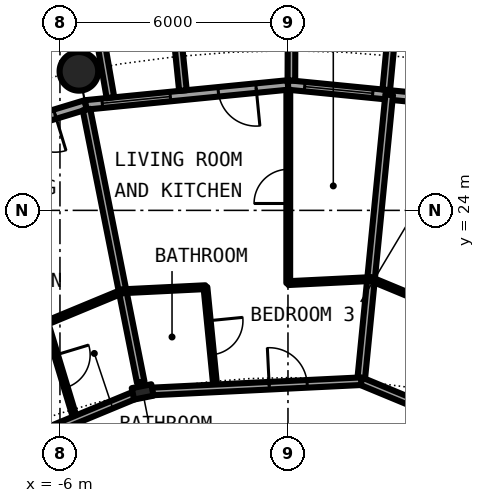
"""IFC4 building model, lengths in metres.
Left out: names, types, materials, properties, quantities, classifications, styles, units other than length and angle.
Written with IfcOpenShell. Run it as: python <this file> out.ifc"""

import sys

from ifc_helpers import new_model, si_unit, direction, frame, frame_2d, origin, origin_2d, place, context, subcontext, project, spatial, rectangle, hollow_circle, i_section, extrude, element, fill, save


model = new_model("IFC4")
c1 = context("Model", 3, precision=1e-05, world=origin(), true_north=direction((0.0, 1.0)))
c2 = subcontext(c1, "Body", "Model", "MODEL_VIEW")
j1 = project(units=[si_unit("LENGTHUNIT", "METRE"), si_unit("PLANEANGLEUNIT", "RADIAN")], contexts=[c1])
p1 = place(None, origin())
s1 = spatial("IfcSite", under=j1, at=p1, CompositionType="ELEMENT")
p2 = place(p1, origin())
s2 = spatial("IfcBuilding", under=s1, at=p2, CompositionType="ELEMENT")
p3 = place(p2, frame((0.0, 0.0, 69.7)))
s3 = spatial("IfcBuildingStorey", under=s2, at=p3, CompositionType="ELEMENT", Elevation=69.7)
p4 = place(p3, frame((-5.501, 27.658, 0.0), z_axis=(0.0, 0.0, 1.0), x_axis=(1.0, 0.0, 0.0)))
e1 = element("IfcColumn", 1, at=p4, inside=s3, PredefinedType="COLUMN", context=c2, shape_type="SweptSolid", body=[
    extrude(hollow_circle(Radius=0.508, WallThickness=0.04, at=origin_2d()), origin(), (0.0, 0.0, 1.0), 3.05),
])
p5 = place(p3, frame((-3.824, 19.223, 0.0), z_axis=(0.0, 0.0, 1.0), x_axis=(-0.195090322016, 0.980785280403, 0.0)))
e2 = element("IfcColumn", 2, at=p5, inside=s3, PredefinedType="COLUMN", context=c2, shape_type="SweptSolid", body=[
    extrude(i_section(OverallWidth=0.306, OverallDepth=0.524, WebThickness=0.021, FlangeThickness=0.04, FilletRadius=0.027, at=origin_2d()), origin(), (0.0, 0.0, 1.0), 3.05),
])
p6 = place(p3, frame((5.326, 26.775, 0.0), z_axis=(0.0, 0.0, 1.0), x_axis=(-0.995173996315, 0.098126026407, 0.0)))
e3 = element("IfcWall", 3, at=p6, inside=s3, PredefinedType="SOLIDWALL", context=c2, shape_type="SweptSolid", body=[
    extrude(rectangle(XDim=5.352, YDim=0.25, at=frame_2d((2.676, 0.0))), origin(), (0.0, 0.0, 1.0), 2.7),
])
p7 = place(p6, frame((0.841, 0.0, 0.0)))
e4 = element("IfcOpeningElement", 4, at=p7, cuts=e3, PredefinedType="OPENING", context=c2, shape_type="SweptSolid", body=[
    extrude(rectangle(XDim=1.0, YDim=2.2, at=frame_2d((0.5, 1.1))), frame((0.0, 0.135, 0.0), z_axis=(0.0, -1.0, 0.0), x_axis=(1.0, 0.0, 0.0)), (0.0, 0.0, 1.0), 0.27),
])
p8 = place(p6, frame((3.111, 0.0, 0.3)))
e5 = element("IfcOpeningElement", 5, at=p8, cuts=e3, PredefinedType="OPENING", context=c2, shape_type="SweptSolid", body=[
    extrude(rectangle(XDim=1.8, YDim=2.1, at=frame_2d((0.9, 1.05))), frame((0.0, 0.135, 0.0), z_axis=(0.0, -1.0, 0.0), x_axis=(1.0, 0.0, 0.0)), (0.0, 0.0, 1.0), 0.27),
])
p9 = place(p3, frame((2.586, 27.171, -0.03), z_axis=(0.0, 0.0, 1.0), x_axis=(0.094548432284, 0.995520262954, 0.0)))
e6 = element("IfcWall", 6, at=p9, inside=s3, PredefinedType="SOLIDWALL", context=c2, shape_type="SweptSolid", body=[
    extrude(rectangle(XDim=3.006, YDim=0.2, at=frame_2d((1.503, 0.0))), origin(), (0.0, 0.0, 1.0), 2.73),
])
p10 = place(p3, frame((0.09, 27.417, -0.03), z_axis=(0.0, 0.0, 1.0), x_axis=(0.00347308367, 0.999993968827, 0.0)))
e7 = element("IfcWall", 7, at=p10, inside=s3, PredefinedType="SOLIDWALL", context=c2, shape_type="SweptSolid", body=[
    extrude(rectangle(XDim=2.882, YDim=0.2, at=frame_2d((1.441, 0.0))), origin(), (0.0, 0.0, 1.0), 2.73),
])
p11 = place(p3, frame((0.0, 27.3, 0.0), z_axis=(0.0, 0.0, 1.0), x_axis=(-0.995173996315, -0.098126026407, 0.0)))
e8 = element("IfcWall", 8, at=p11, inside=s3, PredefinedType="SOLIDWALL", context=c2, shape_type="SweptSolid", body=[
    extrude(rectangle(XDim=5.352, YDim=0.25, at=frame_2d((2.676, 0.0))), origin(), (0.0, 0.0, 1.0), 2.7),
])
p12 = place(p11, frame((0.841, 0.0, 0.0)))
e9 = element("IfcOpeningElement", 9, at=p12, cuts=e8, PredefinedType="OPENING", context=c2, shape_type="SweptSolid", body=[
    extrude(rectangle(XDim=1.0, YDim=2.2, at=frame_2d((0.5, 1.1))), frame((0.0, 0.135, 0.0), z_axis=(0.0, -1.0, 0.0), x_axis=(1.0, 0.0, 0.0)), (0.0, 0.0, 1.0), 0.27),
])
p13 = place(p11, frame((3.111, 0.0, 0.3)))
e10 = element("IfcOpeningElement", 10, at=p13, cuts=e8, PredefinedType="OPENING", context=c2, shape_type="SweptSolid", body=[
    extrude(rectangle(XDim=1.8, YDim=2.1, at=frame_2d((0.9, 1.05))), frame((0.0, 0.135, 0.0), z_axis=(0.0, -1.0, 0.0), x_axis=(1.0, 0.0, 0.0)), (0.0, 0.0, 1.0), 0.27),
])
p14 = place(p3, frame((-2.764, 27.153, -0.03), z_axis=(0.0, 0.0, 1.0), x_axis=(-0.101505487237, 0.994834979311, 0.0)))
e11 = element("IfcWall", 11, at=p14, inside=s3, PredefinedType="SOLIDWALL", context=c2, shape_type="SweptSolid", body=[
    extrude(rectangle(XDim=3.007, YDim=0.2, at=frame_2d((1.503, 0.0))), origin(), (0.0, 0.0, 1.0), 2.73),
])
p15 = place(p3, frame((-4.671, 26.966, -0.03), z_axis=(0.0, 0.0, 1.0), x_axis=(-0.170539878907, 0.985350774954, 0.0)))
e12 = element("IfcWall", 12, at=p15, inside=s3, PredefinedType="SOLIDWALL", context=c2, shape_type="SweptSolid", body=[
    extrude(rectangle(XDim=2.932, YDim=0.2, at=frame_2d((1.466, 0.0))), origin(), (0.0, 0.0, 1.0), 2.73),
])
p16 = place(p3, frame((-5.326, 26.775, 0.0), z_axis=(0.0, 0.0, 1.0), x_axis=(-0.956965678721, -0.290201119486, 0.0)))
e13 = element("IfcWall", 13, at=p16, inside=s3, PredefinedType="SOLIDWALL", context=c2, shape_type="SweptSolid", body=[
    extrude(rectangle(XDim=5.351, YDim=0.25, at=frame_2d((2.676, 0.0))), origin(), (0.0, 0.0, 1.0), 2.7),
])
p17 = place(p16, frame((0.841, 0.0, 0.0)))
e14 = element("IfcOpeningElement", 14, at=p17, cuts=e13, PredefinedType="OPENING", context=c2, shape_type="SweptSolid", body=[
    extrude(rectangle(XDim=1.0, YDim=2.2, at=frame_2d((0.5, 1.1))), frame((0.0, 0.135, 0.0), z_axis=(0.0, -1.0, 0.0), x_axis=(1.0, 0.0, 0.0)), (0.0, 0.0, 1.0), 0.27),
])
p18 = place(p16, frame((3.111, 0.0, 0.3)))
e15 = element("IfcOpeningElement", 15, at=p18, cuts=e13, PredefinedType="OPENING", context=c2, shape_type="SweptSolid", body=[
    extrude(rectangle(XDim=1.8, YDim=2.1, at=frame_2d((0.9, 1.05))), frame((0.0, 0.135, 0.0), z_axis=(0.0, -1.0, 0.0), x_axis=(1.0, 0.0, 0.0)), (0.0, 0.0, 1.0), 0.27),
])
p19 = place(p3, frame((-6.36, 21.039, 0.0), z_axis=(0.0, 0.0, 1.0), x_axis=(0.289375816213, -0.957215564537, 0.0)))
e16 = element("IfcWall", 16, at=p19, inside=s3, PredefinedType="PARTITIONING", context=c2, shape_type="SweptSolid", body=[
    extrude(rectangle(XDim=2.661, YDim=0.1, at=frame_2d((1.331, 0.0))), origin(), (0.0, 0.0, 1.0), 2.7),
])
p20 = place(p19, frame((0.88, 0.0, 0.0)))
e17 = element("IfcOpeningElement", 17, at=p20, cuts=e16, PredefinedType="OPENING", context=c2, shape_type="SweptSolid", body=[
    extrude(rectangle(XDim=0.9, YDim=2.3, at=frame_2d((0.45, 1.15))), frame((0.0, 0.06, 0.0), z_axis=(0.0, -1.0, 0.0), x_axis=(1.0, 0.0, 0.0)), (0.0, 0.0, 1.0), 0.12),
])
p21 = place(p3, frame((-5.302, 26.653, 0.0), z_axis=(0.0, 0.0, 1.0), x_axis=(0.195114589291, -0.98078045303, 0.0)))
e18 = element("IfcWall", 18, at=p21, inside=s3, PredefinedType="PARTITIONING", context=c2, shape_type="SweptSolid", body=[
    extrude(rectangle(XDim=7.314, YDim=0.2, at=frame_2d((3.657, 0.0))), origin(), (0.0, 0.0, 1.0), 2.7),
])
p22 = place(p3, frame((-2.172, 21.979, 0.0), z_axis=(0.0, 0.0, 1.0), x_axis=(0.098383180323, -0.995148606907, 0.0)))
e19 = element("IfcWall", 19, at=p22, inside=s3, PredefinedType="PARTITIONING", context=c2, shape_type="SweptSolid", body=[
    extrude(rectangle(XDim=2.675, YDim=0.1, at=frame_2d((1.337, 0.0))), origin(), (0.0, 0.0, 1.0), 2.7),
])
p23 = place(p22, frame((0.887, 0.0, 0.0)))
e20 = element("IfcOpeningElement", 20, at=p23, cuts=e19, PredefinedType="OPENING", context=c2, shape_type="SweptSolid", body=[
    extrude(rectangle(XDim=0.9, YDim=2.3, at=frame_2d((0.45, 1.15))), frame((0.0, 0.06, 0.0), z_axis=(0.0, -1.0, 0.0), x_axis=(1.0, 0.0, 0.0)), (0.0, 0.0, 1.0), 0.12),
])
p24 = place(p3, frame((0.007, 22.086, 0.0), z_axis=(0.0, 0.0, 1.0), x_axis=(0.000383785052, 0.999999926355, 0.0)))
e21 = element("IfcWall", 21, at=p24, inside=s3, PredefinedType="PARTITIONING", context=c2, shape_type="SweptSolid", body=[
    extrude(rectangle(XDim=5.089, YDim=0.1, at=frame_2d((2.544, 0.0))), origin(), (0.0, 0.0, 1.0), 2.7),
])
p25 = place(p24, frame((2.095, 0.0, 0.0)))
e22 = element("IfcOpeningElement", 22, at=p25, cuts=e21, PredefinedType="OPENING", context=c2, shape_type="SweptSolid", body=[
    extrude(rectangle(XDim=0.9, YDim=2.3, at=frame_2d((0.45, 1.15))), frame((0.0, 0.06, 0.0), z_axis=(0.0, -1.0, 0.0), x_axis=(1.0, 0.0, 0.0)), (0.0, 0.0, 1.0), 0.12),
])
p26 = place(p3, frame((1.921, 19.506, 0.0), z_axis=(0.0, 0.0, 1.0), x_axis=(0.098115395479, 0.995175044487, 0.0)))
e23 = element("IfcWall", 23, at=p26, inside=s3, PredefinedType="PARTITIONING", context=c2, shape_type="SweptSolid", body=[
    extrude(rectangle(XDim=7.574, YDim=0.2, at=frame_2d((3.787, 0.0))), origin(), (0.0, 0.0, 1.0), 2.7),
])
p27 = place(p3, frame((1.921, 19.506, 0.0), z_axis=(0.0, 0.0, 1.0), x_axis=(0.923845560554, -0.38276543763, 0.0)))
e24 = element("IfcWall", 24, at=p27, inside=s3, PredefinedType="PARTITIONING", context=c2, shape_type="SweptSolid", body=[
    extrude(rectangle(XDim=11.381, YDim=0.2, at=frame_2d((5.69, 0.0))), origin(), (0.0, 0.0, 1.0), 2.7),
])
p28 = place(p27, frame((7.087, 0.0, 0.0)))
e25 = element("IfcOpeningElement", 25, at=p28, cuts=e24, PredefinedType="OPENING", context=c2, shape_type="SweptSolid", body=[
    extrude(rectangle(XDim=1.0, YDim=2.3, at=frame_2d((0.5, 1.15))), frame((0.0, 0.11, 0.0), z_axis=(0.0, -1.0, 0.0), x_axis=(1.0, 0.0, 0.0)), (0.0, 0.0, 1.0), 0.22),
])
p29 = place(p3, frame((-10.745, 16.357, 0.0), z_axis=(0.0, 0.0, 1.0), x_axis=(0.923928411035, 0.382565407848, 0.0)))
e26 = element("IfcWall", 26, at=p29, inside=s3, PredefinedType="PARTITIONING", context=c2, shape_type="SweptSolid", body=[
    extrude(rectangle(XDim=7.335, YDim=0.2, at=frame_2d((3.667, 0.0))), origin(), (0.0, 0.0, 1.0), 2.38),
])
p30 = place(p29, frame((2.212, 0.0, 0.0)))
e27 = element("IfcOpeningElement", 27, at=p30, cuts=e26, PredefinedType="OPENING", context=c2, shape_type="SweptSolid", body=[
    extrude(rectangle(XDim=1.0, YDim=2.3, at=frame_2d((0.5, 1.15))), frame((0.0, 0.11, 0.0), z_axis=(0.0, -1.0, 0.0), x_axis=(1.0, 0.0, 0.0)), (0.0, 0.0, 1.0), 0.22),
])
p31 = place(p3, frame((-3.669, 19.231, 0.0), z_axis=(0.0, 0.0, 1.0), x_axis=(0.998803644396, 0.048900715146, 0.0)))
e28 = element("IfcWall", 28, at=p31, inside=s3, PredefinedType="PARTITIONING", context=c2, shape_type="SweptSolid", body=[
    extrude(rectangle(XDim=5.602, YDim=0.2, at=frame_2d((2.801, 0.0))), origin(), (0.0, 0.0, 1.0), 2.38),
])
p32 = place(p31, frame((3.179, 0.0, 0.0)))
e29 = element("IfcOpeningElement", 29, at=p32, cuts=e28, PredefinedType="OPENING", context=c2, shape_type="SweptSolid", body=[
    extrude(rectangle(XDim=1.0, YDim=2.3, at=frame_2d((0.5, 1.15))), frame((0.0, 0.11, 0.0), z_axis=(0.0, -1.0, 0.0), x_axis=(1.0, 0.0, 0.0)), (0.0, 0.0, 1.0), 0.22),
])
p33 = place(p3, frame((2.185, 22.193, 0.0), z_axis=(0.0, 0.0, 1.0), x_axis=(0.923844914631, -0.382766996632, 0.0)))
e30 = element("IfcWall", 30, at=p33, inside=s3, PredefinedType="PARTITIONING", context=c2, shape_type="SweptSolid", body=[
    extrude(rectangle(XDim=6.474, YDim=0.1, at=frame_2d((3.237, 0.0))), origin(), (0.0, 0.0, 1.0), 2.7),
])
p34 = place(p3, frame((-6.36, 21.039, 0.0), z_axis=(0.0, 0.0, 1.0), x_axis=(0.923743082263, 0.383012686436, 0.0)))
e31 = element("IfcWall", 31, at=p34, inside=s3, PredefinedType="PARTITIONING", context=c2, shape_type="SweptSolid", body=[
    extrude(rectangle(XDim=2.175, YDim=0.1, at=frame_2d((1.087, 0.0))), origin(), (0.0, 0.0, 1.0), 2.7),
])
for number, where, z_axis, x_axis in (
    (32, (-4.351, 21.872, 0.0), (0.0, 0.0, 1.0), (0.999, 0.049, 0.0)),
    (33, (0.007, 22.086, 0.0), (0.0, 0.0, 1.0), (0.999, 0.049, 0.0)),
):
    element("IfcWall", number, at=place(p3, frame(where, z_axis=z_axis, x_axis=x_axis)), inside=s3, PredefinedType="PARTITIONING", context=c2, shape_type="SweptSolid", body=[
        extrude(rectangle(XDim=2.182, YDim=0.1, at=frame_2d((1.091, 0.0))), origin(), (0.0, 0.0, 1.0), 2.7),
    ])
p35 = place(p8, origin())
e34 = element("IfcWindow", 34, at=p35, inside=s3, PartitioningType="SINGLE_PANEL", PredefinedType="WINDOW", context=c2, shape_type="SweptSolid", body=[
    extrude(rectangle(XDim=1.8, YDim=2.1, at=frame_2d((0.9, 1.05))), frame((0.0, 0.03, 0.0), z_axis=(0.0, -1.0, 0.0), x_axis=(1.0, 0.0, 0.0)), (0.0, 0.0, 1.0), 0.06),
])
fill(e5, e34)
p36 = place(p12, origin())
e35 = element("IfcDoor", 35, at=p36, inside=s3, OperationType="SINGLE_SWING_LEFT", PredefinedType="DOOR", context=c2, shape_type="SweptSolid", body=[
    extrude(rectangle(XDim=1.0, YDim=2.2, at=frame_2d((0.5, 1.1))), frame((0.0, 0.025, 0.0), z_axis=(0.0, -1.0, 0.0), x_axis=(1.0, 0.0, 0.0)), (0.0, 0.0, 1.0), 0.05),
])
fill(e9, e35)
p37 = place(p13, origin())
e36 = element("IfcWindow", 36, at=p37, inside=s3, PartitioningType="SINGLE_PANEL", PredefinedType="WINDOW", context=c2, shape_type="SweptSolid", body=[
    extrude(rectangle(XDim=1.8, YDim=2.1, at=frame_2d((0.9, 1.05))), frame((0.0, 0.03, 0.0), z_axis=(0.0, -1.0, 0.0), x_axis=(1.0, 0.0, 0.0)), (0.0, 0.0, 1.0), 0.06),
])
fill(e10, e36)
p38 = place(p17, origin())
e37 = element("IfcDoor", 37, at=p38, inside=s3, OperationType="SINGLE_SWING_LEFT", PredefinedType="DOOR", context=c2, shape_type="SweptSolid", body=[
    extrude(rectangle(XDim=1.0, YDim=2.2, at=frame_2d((0.5, 1.1))), frame((0.0, 0.025, 0.0), z_axis=(0.0, -1.0, 0.0), x_axis=(1.0, 0.0, 0.0)), (0.0, 0.0, 1.0), 0.05),
])
fill(e14, e37)
p39 = place(p32, origin())
e38 = element("IfcDoor", 38, at=p39, inside=s3, OperationType="SINGLE_SWING_RIGHT", PredefinedType="DOOR", context=c2, shape_type="SweptSolid", body=[
    extrude(rectangle(XDim=1.0, YDim=2.3, at=frame_2d((0.5, 1.15))), frame((0.0, 0.025, 0.0), z_axis=(0.0, -1.0, 0.0), x_axis=(1.0, 0.0, 0.0)), (0.0, 0.0, 1.0), 0.05),
])
fill(e29, e38)
p40 = place(p23, origin())
e39 = element("IfcDoor", 39, at=p40, inside=s3, OperationType="SINGLE_SWING_RIGHT", PredefinedType="DOOR", context=c2, shape_type="SweptSolid", body=[
    extrude(rectangle(XDim=0.9, YDim=2.3, at=frame_2d((0.45, 1.15))), frame((0.0, 0.025, 0.0), z_axis=(0.0, -1.0, 0.0), x_axis=(1.0, 0.0, 0.0)), (0.0, 0.0, 1.0), 0.05),
])
fill(e20, e39)
p41 = place(p25, origin())
e40 = element("IfcDoor", 40, at=p41, inside=s3, OperationType="SINGLE_SWING_RIGHT", PredefinedType="DOOR", context=c2, shape_type="SweptSolid", body=[
    extrude(rectangle(XDim=0.9, YDim=2.3, at=frame_2d((0.45, 1.15))), frame((0.0, 0.025, 0.0), z_axis=(0.0, -1.0, 0.0), x_axis=(1.0, 0.0, 0.0)), (0.0, 0.0, 1.0), 0.05),
])
fill(e22, e40)
p42 = place(p20, origin())
e41 = element("IfcDoor", 41, at=p42, inside=s3, OperationType="SINGLE_SWING_LEFT", PredefinedType="DOOR", context=c2, shape_type="SweptSolid", body=[
    extrude(rectangle(XDim=0.9, YDim=2.3, at=frame_2d((0.45, 1.15))), frame((0.0, 0.025, 0.0), z_axis=(0.0, -1.0, 0.0), x_axis=(1.0, 0.0, 0.0)), (0.0, 0.0, 1.0), 0.05),
])
fill(e17, e41)
save(model, sys.argv[1])
